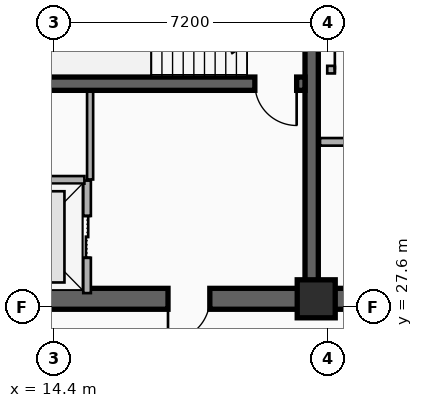
"""IFC4 building model, lengths in metres.
Left out: names, types, materials, properties, quantities, classifications, styles, units other than length and angle.
Written with IfcOpenShell. Run it as: python <this file> out.ifc"""

import sys

from ifc_helpers import new_model, si_unit, direction, frame, frame_2d, origin, origin_2d, place, context, subcontext, project, spatial, rectangle, extrude, element, fill, save


model = new_model("IFC4")
c1 = context("Model", 3, precision=1e-05, world=origin(), true_north=direction((0.0, 1.0)))
c2 = subcontext(c1, "Body", "Model", "MODEL_VIEW")
j1 = project(units=[si_unit("LENGTHUNIT", "METRE"), si_unit("PLANEANGLEUNIT", "RADIAN")], contexts=[c1])
p1 = place(None, origin())
s1 = spatial("IfcSite", under=j1, at=p1, CompositionType="ELEMENT")
p2 = place(p1, origin())
s2 = spatial("IfcBuilding", under=s1, at=p2, CompositionType="ELEMENT")
p3 = place(p2, frame((0.0, 0.0, 180.3)))
s3 = spatial("IfcBuildingStorey", under=s2, at=p3, CompositionType="ELEMENT", Elevation=180.3)
p4 = place(p3, frame((21.18, 27.82, 0.0), z_axis=(0.0, 0.0, 1.0), x_axis=(-1.0, 0.0, 0.0)))
e1 = element("IfcWall", 1, at=p4, inside=s3, PredefinedType="SHEAR", context=c2, shape_type="SweptSolid", body=[
    extrude(rectangle(XDim=9.03, YDim=0.55, at=frame_2d((4.515, 0.0))), origin(), (0.0, 0.0, 1.0), 3.55),
])
p5 = place(p4, frame((2.68, 0.0, 0.0)))
e2 = element("IfcOpeningElement", 2, at=p5, cuts=e1, PredefinedType="OPENING", context=c2, shape_type="SweptSolid", body=[
    extrude(rectangle(XDim=1.1, YDim=2.15, at=frame_2d((0.55, 1.075))), frame((0.0, 0.285, 0.0), z_axis=(0.0, -1.0, 0.0), x_axis=(1.0, 0.0, 0.0)), (0.0, 0.0, 1.0), 0.57),
])
p6 = place(p3, frame((33.15, 27.82, 0.0), z_axis=(0.0, 0.0, 1.0), x_axis=(-1.0, 0.0, 0.0)))
e3 = element("IfcWall", 3, at=p6, inside=s3, PredefinedType="SHEAR", context=c2, shape_type="SweptSolid", body=[
    extrude(rectangle(XDim=11.97, YDim=0.55, at=frame_2d((5.985, 0.0))), origin(), (0.0, 0.0, 1.0), 3.55),
])
p7 = place(p6, frame((6.1, 0.0, 0.0)))
e4 = element("IfcOpeningElement", 4, at=p7, cuts=e3, PredefinedType="OPENING", context=c2, shape_type="SweptSolid", body=[
    extrude(rectangle(XDim=1.6, YDim=2.2, at=frame_2d((0.8, 1.1))), frame((0.0, 0.285, 0.0), z_axis=(0.0, -1.0, 0.0), x_axis=(1.0, 0.0, 0.0)), (0.0, 0.0, 1.0), 0.57),
])
p8 = place(p3, frame((21.18, 28.095, 0.0), z_axis=(0.0, 0.0, 1.0), x_axis=(0.0, 1.0, 0.0)))
e5 = element("IfcWall", 5, at=p8, inside=s3, PredefinedType="SHEAR", context=c2, shape_type="SweptSolid", body=[
    extrude(rectangle(XDim=8.68, YDim=0.35, at=frame_2d((4.34, 0.0))), origin(), (0.0, 0.0, 1.0), 3.55),
])
p9 = place(p3, frame((21.005, 33.48, 0.0), z_axis=(0.0, 0.0, 1.0), x_axis=(-1.0, 0.0, 0.0)))
e6 = element("IfcWall", 6, at=p9, inside=s3, PredefinedType="SHEAR", context=c2, shape_type="SweptSolid", body=[
    extrude(rectangle(XDim=8.58, YDim=0.35, at=frame_2d((4.29, 0.0))), origin(), (0.0, 0.0, 1.0), 3.55),
])
p10 = place(p9, frame((0.22, 0.0, 0.0)))
e7 = element("IfcOpeningElement", 7, at=p10, cuts=e6, PredefinedType="OPENING", context=c2, shape_type="SweptSolid", body=[
    extrude(rectangle(XDim=1.1, YDim=2.15, at=frame_2d((0.55, 1.075))), frame((0.0, 0.185, 0.0), z_axis=(0.0, -1.0, 0.0), x_axis=(1.0, 0.0, 0.0)), (0.0, 0.0, 1.0), 0.37),
])
p11 = place(p3, frame((21.3, 27.82, 0.0), z_axis=(0.0, 0.0, 1.0), x_axis=(1.0, 0.0, 0.0)))
e8 = element("IfcColumn", 8, at=p11, inside=s3, PredefinedType="COLUMN", context=c2, shape_type="SweptSolid", body=[
    extrude(rectangle(XDim=1.0, YDim=1.0, at=origin_2d()), origin(), (0.0, 0.0, 1.0), 3.55),
])
p12 = place(p3, frame((15.27, 27.97, 0.0), z_axis=(0.0, 0.0, 1.0), x_axis=(0.0, 1.0, 0.0)))
e9 = element("IfcWall", 9, at=p12, inside=s3, PredefinedType="PARTITIONING", context=c2, shape_type="SweptSolid", body=[
    extrude(rectangle(XDim=2.96, YDim=0.2, at=frame_2d((1.48, 0.0))), origin(), (0.0, 0.0, 1.0), 2.36),
])
p13 = place(p12, frame((0.93, 0.0, 0.0)))
e10 = element("IfcOpeningElement", 10, at=p13, cuts=e9, PredefinedType="OPENING", context=c2, shape_type="SweptSolid", body=[
    extrude(rectangle(XDim=1.1, YDim=2.15, at=frame_2d((0.55, 1.075))), frame((0.0, 0.11, 0.0), z_axis=(0.0, -1.0, 0.0), x_axis=(1.0, 0.0, 0.0)), (0.0, 0.0, 1.0), 0.22),
])
p14 = place(p3, frame((12.45, 30.95, 0.0), z_axis=(0.0, 0.0, 1.0), x_axis=(1.0, 0.0, 0.0)))
e11 = element("IfcWall", 11, at=p14, inside=s3, PredefinedType="PARTITIONING", context=c2, shape_type="SweptSolid", body=[
    extrude(rectangle(XDim=2.75, YDim=0.2, at=frame_2d((1.375, 0.0))), origin(), (0.0, 0.0, 1.0), 2.36),
])
p15 = place(p3, frame((21.4, 31.95, 0.0), z_axis=(0.0, 0.0, 1.0), x_axis=(1.0, 0.0, 0.0)))
e12 = element("IfcWall", 12, at=p15, inside=s3, PredefinedType="PARTITIONING", context=c2, shape_type="SweptSolid", body=[
    extrude(rectangle(XDim=3.66, YDim=0.2, at=frame_2d((1.83, 0.0))), origin(), (0.0, 0.0, 1.0), 2.36),
])
p16 = place(p15, frame((1.23, 0.0, 0.0)))
e13 = element("IfcOpeningElement", 13, at=p16, cuts=e12, PredefinedType="OPENING", context=c2, shape_type="SweptSolid", body=[
    extrude(rectangle(XDim=1.2, YDim=2.15, at=frame_2d((0.6, 1.075))), frame((0.0, 0.11, 0.0), z_axis=(0.0, -1.0, 0.0), x_axis=(1.0, 0.0, 0.0)), (0.0, 0.0, 1.0), 0.22),
])
p17 = place(p3, frame((21.59, 33.85, 0.0), z_axis=(0.0, 0.0, 1.0), x_axis=(1.0, 0.0, 0.0)))
e14 = element("IfcWall", 14, at=p17, inside=s3, PredefinedType="PARTITIONING", context=c2, shape_type="SweptSolid", body=[
    extrude(rectangle(XDim=2.92, YDim=0.2, at=frame_2d((1.46, 0.0))), origin(), (0.0, 0.0, 1.0), 2.36),
])
p18 = place(p17, frame((0.2, 0.0, 0.0)))
e15 = element("IfcOpeningElement", 15, at=p18, cuts=e14, PredefinedType="OPENING", context=c2, shape_type="SweptSolid", body=[
    extrude(rectangle(XDim=1.2, YDim=2.15, at=frame_2d((0.6, 1.075))), frame((0.0, 0.11, 0.0), z_axis=(0.0, -1.0, 0.0), x_axis=(1.0, 0.0, 0.0)), (0.0, 0.0, 1.0), 0.22),
])
p19 = place(p3, frame((15.35, 30.96, 0.0), z_axis=(0.0, 0.0, 1.0), x_axis=(0.0, 1.0, 0.0)))
e16 = element("IfcWall", 16, at=p19, inside=s3, PredefinedType="PARTITIONING", context=c2, shape_type="SweptSolid", body=[
    extrude(rectangle(XDim=2.31, YDim=0.16, at=frame_2d((1.155, 0.0))), origin(), (0.0, 0.0, 1.0), 3.29),
])
p20 = place(p13, origin())
e17 = element("IfcDoor", 17, at=p20, inside=s3, OperationType="DOUBLE_DOOR_SLIDING", PredefinedType="DOOR", context=c2, shape_type="SweptSolid", body=[
    extrude(rectangle(XDim=1.1, YDim=2.15, at=frame_2d((0.55, 1.075))), frame((0.0, 0.025, 0.0), z_axis=(0.0, -1.0, 0.0), x_axis=(1.0, 0.0, 0.0)), (0.0, 0.0, 1.0), 0.05),
])
fill(e10, e17)
p21 = place(p10, origin())
e18 = element("IfcDoor", 18, at=p21, inside=s3, OperationType="SINGLE_SWING_LEFT", PredefinedType="DOOR", context=c2, shape_type="SweptSolid", body=[
    extrude(rectangle(XDim=1.1, YDim=2.15, at=frame_2d((0.55, 1.075))), frame((0.0, 0.025, 0.0), z_axis=(0.0, -1.0, 0.0), x_axis=(1.0, 0.0, 0.0)), (0.0, 0.0, 1.0), 0.05),
])
fill(e7, e18)
p22 = place(p5, origin())
e19 = element("IfcDoor", 19, at=p22, inside=s3, OperationType="SINGLE_SWING_RIGHT", PredefinedType="DOOR", context=c2, shape_type="SweptSolid", body=[
    extrude(rectangle(XDim=1.1, YDim=2.15, at=frame_2d((0.55, 1.075))), frame((0.0, 0.025, 0.0), z_axis=(0.0, -1.0, 0.0), x_axis=(1.0, 0.0, 0.0)), (0.0, 0.0, 1.0), 0.05),
])
fill(e2, e19)
p23 = place(p18, origin())
e20 = element("IfcDoor", 20, at=p23, inside=s3, OperationType="SINGLE_SWING_LEFT", PredefinedType="DOOR", context=c2, shape_type="SweptSolid", body=[
    extrude(rectangle(XDim=1.2, YDim=2.15, at=frame_2d((0.6, 1.075))), frame((0.0, 0.025, 0.0), z_axis=(0.0, -1.0, 0.0), x_axis=(1.0, 0.0, 0.0)), (0.0, 0.0, 1.0), 0.05),
])
fill(e15, e20)
save(model, sys.argv[1])
